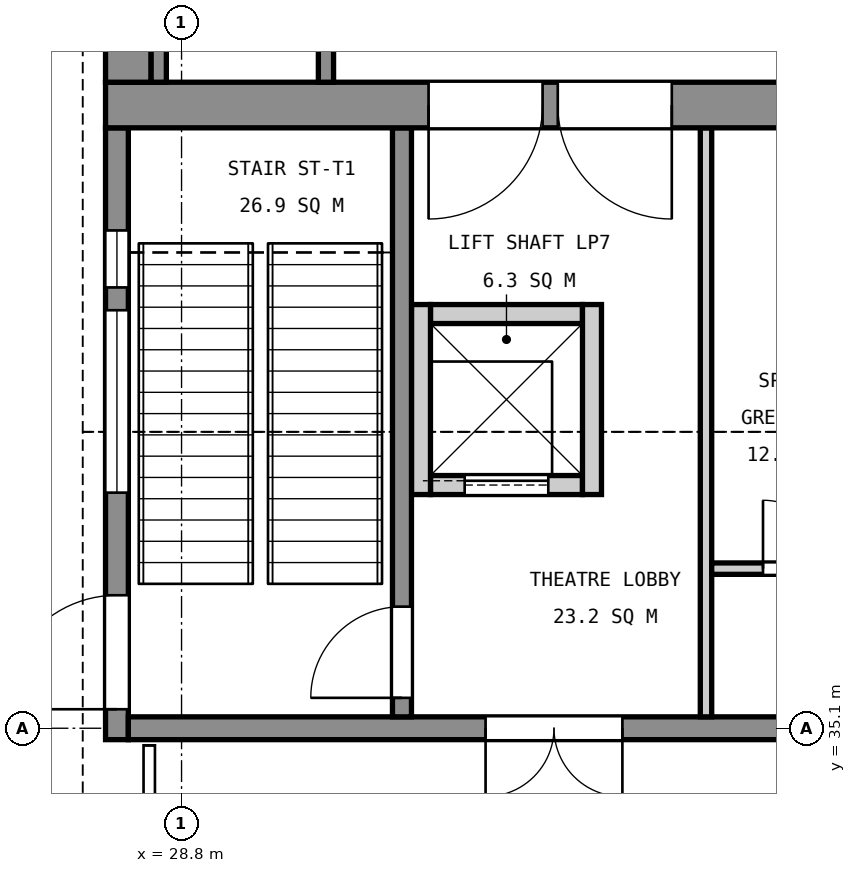
"""IFC4 building model, lengths in metres.
Left out: names, types, materials, properties, quantities, classifications, styles, units other than length and angle.
Written with IfcOpenShell. Run it as: python <this file> out.ifc"""

import sys

from ifc_helpers import new_model, si_unit, direction, frame, frame_2d, origin, place, context, subcontext, project, spatial, rectangle, extrude, element, fill, save


model = new_model("IFC4")
c1 = context("Model", 3, precision=1e-05, world=origin(), true_north=direction((0.0, 1.0)))
c2 = subcontext(c1, "Body", "Model", "MODEL_VIEW")
j1 = project(units=[si_unit("LENGTHUNIT", "METRE"), si_unit("PLANEANGLEUNIT", "RADIAN")], contexts=[c1])
p1 = place(None, origin())
s1 = spatial("IfcSite", under=j1, at=p1, CompositionType="ELEMENT")
p2 = place(p1, origin())
s2 = spatial("IfcBuilding", under=s1, at=p2, CompositionType="ELEMENT")
p3 = place(p2, origin())
s3 = spatial("IfcBuildingStorey", under=s2, at=p3, CompositionType="ELEMENT", Elevation=0.0)
p4 = place(p3, frame((32.075, 38.3, 0.0), z_axis=(0.0, 0.0, 1.0), x_axis=(1.0, 0.0, 0.0)))
e1 = element("IfcWall", 1, at=p4, inside=s3, PredefinedType="SOLIDWALL", context=c2, shape_type="SweptSolid", body=[
    extrude(rectangle(XDim=2.0, YDim=0.25, at=frame_2d((1.0, 0.0))), origin(), (0.0, 0.0, 1.0), 5.7),
])
p5 = place(p4, frame((0.45, 0.0, 0.0)))
e2 = element("IfcOpeningElement", 2, at=p5, cuts=e1, PredefinedType="OPENING", context=c2, shape_type="SweptSolid", body=[
    extrude(rectangle(XDim=1.1, YDim=2.1, at=frame_2d((0.55, 1.05))), frame((0.0, 0.135, 0.0), z_axis=(0.0, -1.0, 0.0), x_axis=(1.0, 0.0, 0.0)), (0.0, 0.0, 1.0), 0.27),
])
p6 = place(p3, frame((32.075, 40.55, 0.0), z_axis=(0.0, 0.0, 1.0), x_axis=(1.0, 0.0, 0.0)))
e3 = element("IfcWall", 3, at=p6, inside=s3, PredefinedType="SOLIDWALL", context=c2, shape_type="SweptSolid", body=[
    extrude(rectangle(XDim=2.0, YDim=0.25, at=frame_2d((1.0, 0.0))), origin(), (0.0, 0.0, 1.0), 5.7),
])
for number, where, z_axis, x_axis in (
    (4, (31.95, 38.175, 0.0), (0.0, 0.0, 1.0), (0.0, 1.0, 0.0)),
    (5, (34.2, 38.175, 0.0), (0.0, 0.0, 1.0), (0.0, 1.0, 0.0)),
):
    element("IfcWall", number, at=place(p3, frame(where, z_axis=z_axis, x_axis=x_axis)), inside=s3, PredefinedType="SOLIDWALL", context=c2, shape_type="SweptSolid", body=[
        extrude(rectangle(XDim=2.5, YDim=0.25, at=frame_2d((1.25, 0.0))), origin(), (0.0, 0.0, 1.0), 5.7),
    ])
p7 = place(p3, frame((27.95, 34.95, 0.0), z_axis=(0.0, 0.0, 1.0), x_axis=(0.0, 1.0, 0.0)))
e6 = element("IfcWall", 6, at=p7, inside=s3, PredefinedType="SOLIDWALL", context=c2, shape_type="SweptSolid", body=[
    extrude(rectangle(XDim=8.05, YDim=0.3, at=frame_2d((4.025, 0.0))), origin(), (0.0, 0.0, 1.0), 5.7),
])
p8 = place(p7, frame((0.4, 0.0, 0.0)))
e7 = element("IfcOpeningElement", 7, at=p8, cuts=e6, PredefinedType="OPENING", context=c2, shape_type="SweptSolid", body=[
    extrude(rectangle(XDim=1.5, YDim=2.4, at=frame_2d((0.75, 1.2))), frame((0.0, 0.16, 0.0), z_axis=(0.0, -1.0, 0.0), x_axis=(1.0, 0.0, 0.0)), (0.0, 0.0, 1.0), 0.32),
])
p9 = place(p7, frame((3.25, 0.0, 0.9)))
e8 = element("IfcOpeningElement", 8, at=p9, cuts=e6, PredefinedType="OPENING", context=c2, shape_type="SweptSolid", body=[
    extrude(rectangle(XDim=2.4, YDim=1.8, at=frame_2d((1.2, 0.9))), frame((0.0, 0.16, 0.0), z_axis=(0.0, -1.0, 0.0), x_axis=(1.0, 0.0, 0.0)), (0.0, 0.0, 1.0), 0.32),
])
p10 = place(p7, frame((5.95, 0.0, 0.8)))
e9 = element("IfcOpeningElement", 9, at=p10, cuts=e6, PredefinedType="OPENING", context=c2, shape_type="SweptSolid", body=[
    extrude(rectangle(XDim=0.75, YDim=1.2, at=frame_2d((0.375, 0.6))), frame((0.0, 0.16, 0.0), z_axis=(0.0, -1.0, 0.0), x_axis=(1.0, 0.0, 0.0)), (0.0, 0.0, 1.0), 0.32),
])
p11 = place(p3, frame((28.1, 35.1, 0.0), z_axis=(0.0, 0.0, 1.0), x_axis=(1.0, 0.0, 0.0)))
e10 = element("IfcWall", 10, at=p11, inside=s3, PredefinedType="SOLIDWALL", context=c2, shape_type="SweptSolid", body=[
    extrude(rectangle(XDim=26.8, YDim=0.3, at=frame_2d((13.4, 0.0))), origin(), (0.0, 0.0, 1.0), 5.7),
])
p12 = place(p11, frame((4.7, 0.0, 0.0)))
e11 = element("IfcOpeningElement", 11, at=p12, cuts=e10, PredefinedType="OPENING", context=c2, shape_type="SweptSolid", body=[
    extrude(rectangle(XDim=1.8, YDim=2.4, at=frame_2d((0.9, 1.2))), frame((0.0, 0.16, 0.0), z_axis=(0.0, -1.0, 0.0), x_axis=(1.0, 0.0, 0.0)), (0.0, 0.0, 1.0), 0.32),
])
p13 = place(p11, frame((9.0, 0.0, 0.0)))
e12 = element("IfcOpeningElement", 12, at=p13, cuts=e10, PredefinedType="OPENING", context=c2, shape_type="SweptSolid", body=[
    extrude(rectangle(XDim=1.8, YDim=2.4, at=frame_2d((0.9, 1.2))), frame((0.0, 0.16, 0.0), z_axis=(0.0, -1.0, 0.0), x_axis=(1.0, 0.0, 0.0)), (0.0, 0.0, 1.0), 0.32),
])
p14 = place(p11, frame((13.0, 0.0, 0.0)))
e13 = element("IfcOpeningElement", 13, at=p14, cuts=e10, PredefinedType="OPENING", context=c2, shape_type="SweptSolid", body=[
    extrude(rectangle(XDim=1.8, YDim=2.4, at=frame_2d((0.9, 1.2))), frame((0.0, 0.16, 0.0), z_axis=(0.0, -1.0, 0.0), x_axis=(1.0, 0.0, 0.0)), (0.0, 0.0, 1.0), 0.32),
])
p15 = place(p3, frame((31.7, 35.25, 0.0), z_axis=(0.0, 0.0, 1.0), x_axis=(0.0, 1.0, 0.0)))
e14 = element("IfcWall", 14, at=p15, inside=s3, PredefinedType="SOLIDWALL", context=c2, shape_type="SweptSolid", body=[
    extrude(rectangle(XDim=7.75, YDim=0.25, at=frame_2d((3.875, 0.0))), origin(), (0.0, 0.0, 1.0), 5.7),
])
p16 = place(p15, frame((0.25, 0.0, 0.0)))
e15 = element("IfcOpeningElement", 15, at=p16, cuts=e14, PredefinedType="OPENING", context=c2, shape_type="SweptSolid", body=[
    extrude(rectangle(XDim=1.2, YDim=2.1, at=frame_2d((0.6, 1.05))), frame((0.0, 0.135, 0.0), z_axis=(0.0, -1.0, 0.0), x_axis=(1.0, 0.0, 0.0)), (0.0, 0.0, 1.0), 0.27),
])
p17 = place(p3, frame((35.7, 35.25, 0.0), z_axis=(0.0, 0.0, 1.0), x_axis=(0.0, 1.0, 0.0)))
e16 = element("IfcWall", 16, at=p17, inside=s3, PredefinedType="SOLIDWALL", context=c2, shape_type="SweptSolid", body=[
    extrude(rectangle(XDim=7.75, YDim=0.15, at=frame_2d((3.875, 0.0))), origin(), (0.0, 0.0, 1.0), 5.7),
])
p18 = place(p3, frame((35.775, 37.2, 0.0), z_axis=(0.0, 0.0, 1.0), x_axis=(1.0, 0.0, 0.0)))
e17 = element("IfcWall", 17, at=p18, inside=s3, PredefinedType="SOLIDWALL", context=c2, shape_type="SweptSolid", body=[
    extrude(rectangle(XDim=15.4, YDim=0.15, at=frame_2d((7.7, 0.0))), origin(), (0.0, 0.0, 1.0), 5.7),
])
p19 = place(p18, frame((0.675, 0.0, 0.0)))
e18 = element("IfcOpeningElement", 18, at=p19, cuts=e17, PredefinedType="OPENING", context=c2, shape_type="SweptSolid", body=[
    extrude(rectangle(XDim=0.9, YDim=2.1, at=frame_2d((0.45, 1.05))), frame((0.0, 0.085, 0.0), z_axis=(0.0, -1.0, 0.0), x_axis=(1.0, 0.0, 0.0)), (0.0, 0.0, 1.0), 0.17),
])
p20 = place(p18, frame((2.775, 0.0, 0.0)))
e19 = element("IfcOpeningElement", 19, at=p20, cuts=e17, PredefinedType="OPENING", context=c2, shape_type="SweptSolid", body=[
    extrude(rectangle(XDim=0.9, YDim=2.1, at=frame_2d((0.45, 1.05))), frame((0.0, 0.085, 0.0), z_axis=(0.0, -1.0, 0.0), x_axis=(1.0, 0.0, 0.0)), (0.0, 0.0, 1.0), 0.17),
])
p21 = place(p18, frame((4.775, 0.0, 0.0)))
e20 = element("IfcOpeningElement", 20, at=p21, cuts=e17, PredefinedType="OPENING", context=c2, shape_type="SweptSolid", body=[
    extrude(rectangle(XDim=1.2, YDim=2.1, at=frame_2d((0.6, 1.05))), frame((0.0, 0.085, 0.0), z_axis=(0.0, -1.0, 0.0), x_axis=(1.0, 0.0, 0.0)), (0.0, 0.0, 1.0), 0.17),
])
p22 = place(p18, frame((6.925, 0.0, 0.0)))
e21 = element("IfcOpeningElement", 21, at=p22, cuts=e17, PredefinedType="OPENING", context=c2, shape_type="SweptSolid", body=[
    extrude(rectangle(XDim=0.9, YDim=2.1, at=frame_2d((0.45, 1.05))), frame((0.0, 0.085, 0.0), z_axis=(0.0, -1.0, 0.0), x_axis=(1.0, 0.0, 0.0)), (0.0, 0.0, 1.0), 0.17),
])
p23 = place(p18, frame((8.725, 0.0, 0.0)))
e22 = element("IfcOpeningElement", 22, at=p23, cuts=e17, PredefinedType="OPENING", context=c2, shape_type="SweptSolid", body=[
    extrude(rectangle(XDim=0.9, YDim=2.1, at=frame_2d((0.45, 1.05))), frame((0.0, 0.085, 0.0), z_axis=(0.0, -1.0, 0.0), x_axis=(1.0, 0.0, 0.0)), (0.0, 0.0, 1.0), 0.17),
])
p24 = place(p18, frame((10.575, 0.0, 0.0)))
e23 = element("IfcOpeningElement", 23, at=p24, cuts=e17, PredefinedType="OPENING", context=c2, shape_type="SweptSolid", body=[
    extrude(rectangle(XDim=0.9, YDim=2.1, at=frame_2d((0.45, 1.05))), frame((0.0, 0.085, 0.0), z_axis=(0.0, -1.0, 0.0), x_axis=(1.0, 0.0, 0.0)), (0.0, 0.0, 1.0), 0.17),
])
p25 = place(p18, frame((12.275, 0.0, 0.0)))
e24 = element("IfcOpeningElement", 24, at=p25, cuts=e17, PredefinedType="OPENING", context=c2, shape_type="SweptSolid", body=[
    extrude(rectangle(XDim=1.2, YDim=2.1, at=frame_2d((0.6, 1.05))), frame((0.0, 0.085, 0.0), z_axis=(0.0, -1.0, 0.0), x_axis=(1.0, 0.0, 0.0)), (0.0, 0.0, 1.0), 0.17),
])
p26 = place(p18, frame((14.275, 0.0, 0.0)))
e25 = element("IfcOpeningElement", 25, at=p26, cuts=e17, PredefinedType="OPENING", context=c2, shape_type="SweptSolid", body=[
    extrude(rectangle(XDim=0.9, YDim=2.1, at=frame_2d((0.45, 1.05))), frame((0.0, 0.085, 0.0), z_axis=(0.0, -1.0, 0.0), x_axis=(1.0, 0.0, 0.0)), (0.0, 0.0, 1.0), 0.17),
])
p27 = place(p3, frame((27.8, 43.3, 0.0), z_axis=(0.0, 0.0, 1.0), x_axis=(1.0, 0.0, 0.0)))
e26 = element("IfcWall", 26, at=p27, inside=s3, PredefinedType="SOLIDWALL", context=c2, shape_type="SweptSolid", body=[
    extrude(rectangle(XDim=27.4, YDim=0.6, at=frame_2d((13.7, 0.0))), origin(), (0.0, 0.0, 1.0), 6.0),
])
p28 = place(p27, frame((4.25, 0.0, 0.0)))
e27 = element("IfcOpeningElement", 27, at=p28, cuts=e26, PredefinedType="OPENING", context=c2, shape_type="SweptSolid", body=[
    extrude(rectangle(XDim=1.5, YDim=2.4, at=frame_2d((0.75, 1.2))), frame((0.0, 0.31, 0.0), z_axis=(0.0, -1.0, 0.0), x_axis=(1.0, 0.0, 0.0)), (0.0, 0.0, 1.0), 0.62),
])
p29 = place(p27, frame((5.95, 0.0, 0.0)))
e28 = element("IfcOpeningElement", 28, at=p29, cuts=e26, PredefinedType="OPENING", context=c2, shape_type="SweptSolid", body=[
    extrude(rectangle(XDim=1.5, YDim=2.4, at=frame_2d((0.75, 1.2))), frame((0.0, 0.31, 0.0), z_axis=(0.0, -1.0, 0.0), x_axis=(1.0, 0.0, 0.0)), (0.0, 0.0, 1.0), 0.62),
])
p30 = place(p3, frame((28.1, 43.6, 0.0), z_axis=(0.0, 0.0, 1.0), x_axis=(0.0, 1.0, 0.0)))
e29 = element("IfcWall", 29, at=p30, inside=s3, PredefinedType="SOLIDWALL", context=c2, shape_type="SweptSolid", body=[
    extrude(rectangle(XDim=21.8, YDim=0.6, at=frame_2d((10.9, 0.0))), origin(), (0.0, 0.0, 1.0), 6.0),
])
p31 = place(p30, frame((2.3, 0.0, 0.0)))
e30 = element("IfcOpeningElement", 30, at=p31, cuts=e29, PredefinedType="OPENING", context=c2, shape_type="SweptSolid", body=[
    extrude(rectangle(XDim=2.2, YDim=2.4, at=frame_2d((1.1, 1.2))), frame((0.0, 0.31, 0.0), z_axis=(0.0, -1.0, 0.0), x_axis=(1.0, 0.0, 0.0)), (0.0, 0.0, 1.0), 0.62),
])
p32 = place(p30, frame((17.3, 0.0, 0.0)))
e31 = element("IfcOpeningElement", 31, at=p32, cuts=e29, PredefinedType="OPENING", context=c2, shape_type="SweptSolid", body=[
    extrude(rectangle(XDim=2.2, YDim=2.4, at=frame_2d((1.1, 1.2))), frame((0.0, 0.31, 0.0), z_axis=(0.0, -1.0, 0.0), x_axis=(1.0, 0.0, 0.0)), (0.0, 0.0, 1.0), 0.62),
])
for number, where, z_axis, x_axis in (
    (32, (28.5, 43.6, 0.0), (0.0, 0.0, 1.0), (0.0, 1.0, 0.0)),
    (33, (30.7, 43.6, 0.0), (0.0, 0.0, 1.0), (0.0, 1.0, 0.0)),
):
    element("IfcWall", number, at=place(p3, frame(where, z_axis=z_axis, x_axis=x_axis)), inside=s3, PredefinedType="SOLIDWALL", context=c2, shape_type="SweptSolid", body=[
        extrude(rectangle(XDim=21.8, YDim=0.2, at=frame_2d((10.9, 0.0))), origin(), (0.0, 0.0, 1.0), 0.34),
    ])
p33 = place(p8, origin())
e34 = element("IfcDoor", 34, at=p33, inside=s3, OperationType="SINGLE_SWING_LEFT", PredefinedType="DOOR", context=c2, shape_type="SweptSolid", body=[
    extrude(rectangle(XDim=1.5, YDim=2.4, at=frame_2d((0.75, 1.2))), frame((0.0, 0.025, 0.0), z_axis=(0.0, -1.0, 0.0), x_axis=(1.0, 0.0, 0.0)), (0.0, 0.0, 1.0), 0.05),
])
fill(e7, e34)
p34 = place(p16, origin())
e35 = element("IfcDoor", 35, at=p34, inside=s3, OperationType="SINGLE_SWING_LEFT", PredefinedType="DOOR", context=c2, shape_type="SweptSolid", body=[
    extrude(rectangle(XDim=1.2, YDim=2.1, at=frame_2d((0.6, 1.05))), frame((0.0, 0.025, 0.0), z_axis=(0.0, -1.0, 0.0), x_axis=(1.0, 0.0, 0.0)), (0.0, 0.0, 1.0), 0.05),
])
fill(e15, e35)
p35 = place(p12, frame((1.8, 0.0, 0.0), z_axis=(0.0, 0.0, 1.0), x_axis=(-1.0, 0.0, 0.0)))
e36 = element("IfcDoor", 36, at=p35, inside=s3, OperationType="DOUBLE_DOOR_SINGLE_SWING", PredefinedType="DOOR", context=c2, shape_type="SweptSolid", body=[
    extrude(rectangle(XDim=1.8, YDim=2.4, at=frame_2d((0.9, 1.2))), frame((0.0, 0.025, 0.0), z_axis=(0.0, -1.0, 0.0), x_axis=(1.0, 0.0, 0.0)), (0.0, 0.0, 1.0), 0.05),
])
fill(e11, e36)
p36 = place(p5, origin())
e37 = element("IfcDoor", 37, at=p36, inside=s3, OperationType="SLIDING_TO_LEFT", PredefinedType="DOOR", context=c2, shape_type="SweptSolid", body=[
    extrude(rectangle(XDim=1.1, YDim=2.1, at=frame_2d((0.55, 1.05))), frame((0.0, 0.025, 0.0), z_axis=(0.0, -1.0, 0.0), x_axis=(1.0, 0.0, 0.0)), (0.0, 0.0, 1.0), 0.05),
])
fill(e2, e37)
p37 = place(p28, frame((1.5, 0.0, 0.0), z_axis=(0.0, 0.0, 1.0), x_axis=(-1.0, 0.0, 0.0)))
e38 = element("IfcDoor", 38, at=p37, inside=s3, OperationType="SINGLE_SWING_RIGHT", PredefinedType="DOOR", context=c2, shape_type="SweptSolid", body=[
    extrude(rectangle(XDim=1.5, YDim=2.4, at=frame_2d((0.75, 1.2))), frame((0.0, 0.025, 0.0), z_axis=(0.0, -1.0, 0.0), x_axis=(1.0, 0.0, 0.0)), (0.0, 0.0, 1.0), 0.05),
])
fill(e27, e38)
p38 = place(p29, frame((1.5, 0.0, 0.0), z_axis=(0.0, 0.0, 1.0), x_axis=(-1.0, 0.0, 0.0)))
e39 = element("IfcDoor", 39, at=p38, inside=s3, OperationType="SINGLE_SWING_LEFT", PredefinedType="DOOR", context=c2, shape_type="SweptSolid", body=[
    extrude(rectangle(XDim=1.5, YDim=2.4, at=frame_2d((0.75, 1.2))), frame((0.0, 0.025, 0.0), z_axis=(0.0, -1.0, 0.0), x_axis=(1.0, 0.0, 0.0)), (0.0, 0.0, 1.0), 0.05),
])
fill(e28, e39)
p39 = place(p19, origin())
e40 = element("IfcDoor", 40, at=p39, inside=s3, OperationType="SINGLE_SWING_LEFT", PredefinedType="DOOR", context=c2, shape_type="SweptSolid", body=[
    extrude(rectangle(XDim=0.9, YDim=2.1, at=frame_2d((0.45, 1.05))), frame((0.0, 0.025, 0.0), z_axis=(0.0, -1.0, 0.0), x_axis=(1.0, 0.0, 0.0)), (0.0, 0.0, 1.0), 0.05),
])
fill(e18, e40)
p40 = place(p9, origin())
e41 = element("IfcWindow", 41, at=p40, inside=s3, PartitioningType="SINGLE_PANEL", PredefinedType="WINDOW", context=c2, shape_type="SweptSolid", body=[
    extrude(rectangle(XDim=2.4, YDim=1.8, at=frame_2d((1.2, 0.9))), frame((0.0, 0.03, 0.0), z_axis=(0.0, -1.0, 0.0), x_axis=(1.0, 0.0, 0.0)), (0.0, 0.0, 1.0), 0.06),
])
fill(e8, e41)
p41 = place(p10, origin())
e42 = element("IfcWindow", 42, at=p41, inside=s3, PartitioningType="SINGLE_PANEL", PredefinedType="WINDOW", context=c2, shape_type="SweptSolid", body=[
    extrude(rectangle(XDim=0.75, YDim=1.2, at=frame_2d((0.375, 0.6))), frame((0.0, 0.03, 0.0), z_axis=(0.0, -1.0, 0.0), x_axis=(1.0, 0.0, 0.0)), (0.0, 0.0, 1.0), 0.06),
])
fill(e9, e42)
save(model, sys.argv[1])
